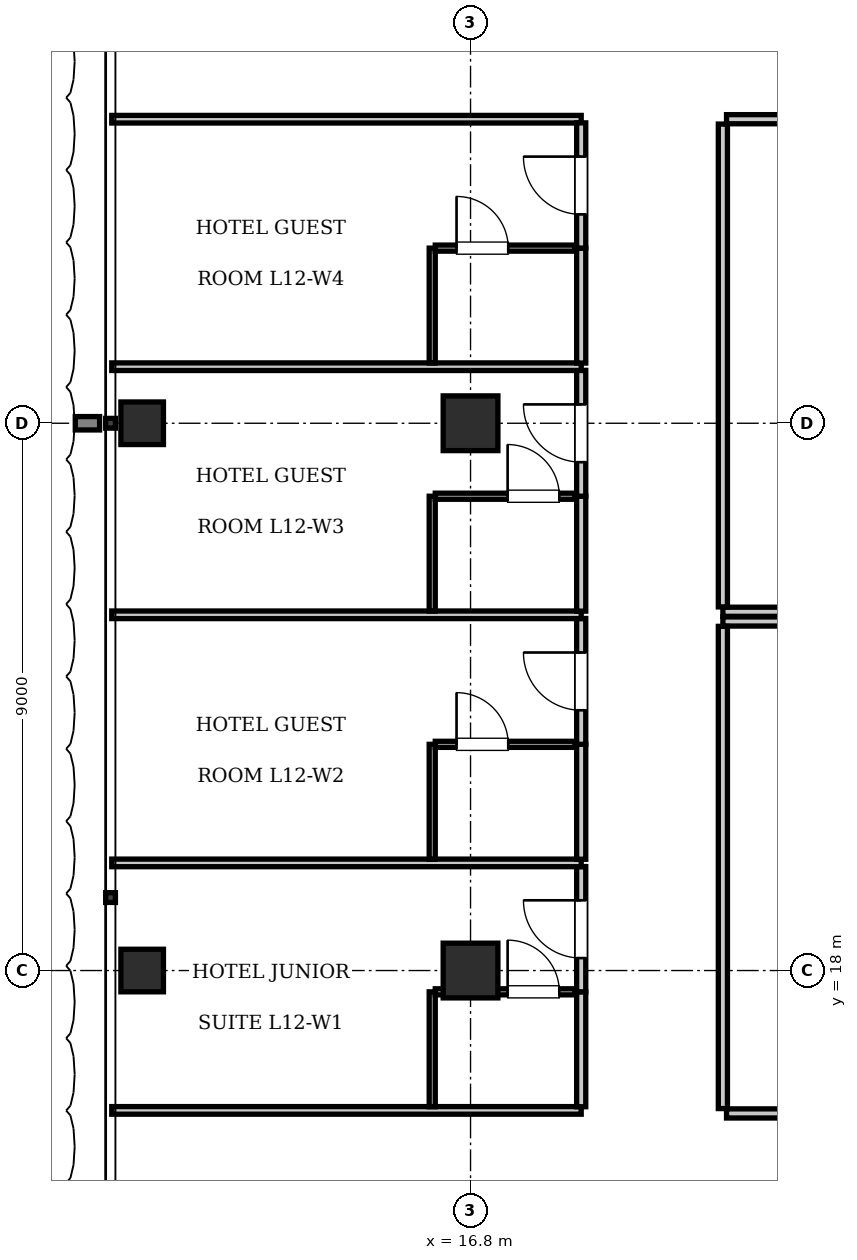
"""IFC4 building model, lengths in metres.
Left out: names, types, materials, properties, quantities, classifications, styles, units other than length and angle.
Written with IfcOpenShell. Run it as: python <this file> out.ifc"""

import sys

from ifc_helpers import new_model, si_unit, direction, frame, frame_2d, origin, origin_2d, place, context, subcontext, project, spatial, rectangle, i_section, extrude, element, fill, save


model = new_model("IFC4")
c1 = context("Model", 3, precision=1e-05, world=origin(), true_north=direction((0.0, 1.0)))
c2 = subcontext(c1, "Body", "Model", "MODEL_VIEW")
j1 = project(units=[si_unit("LENGTHUNIT", "METRE"), si_unit("PLANEANGLEUNIT", "RADIAN")], contexts=[c1])
p1 = place(None, origin())
s1 = spatial("IfcSite", under=j1, at=p1, CompositionType="ELEMENT")
p2 = place(p1, origin())
s2 = spatial("IfcBuilding", under=s1, at=p2, CompositionType="ELEMENT")
p3 = place(p2, frame((0.0, 0.0, 53.9)))
s3 = spatial("IfcBuildingStorey", under=s2, at=p3, CompositionType="ELEMENT", Elevation=53.9)
for number, where, z_axis, x_axis in (
    (1, (16.8, 18.0, 0.0), (0.0, 0.0, 1.0), (1.0, 0.0, 0.0)),
    (2, (16.8, 27.0, 0.0), (0.0, 0.0, 1.0), (1.0, 0.0, 0.0)),
):
    element("IfcColumn", number, at=place(p3, frame(where, z_axis=z_axis, x_axis=x_axis)), inside=s3, PredefinedType="COLUMN", context=c2, shape_type="SweptSolid", body=[
        extrude(rectangle(XDim=0.9, YDim=0.9, at=origin_2d()), origin(), (0.0, 0.0, 1.0), 3.85),
    ])
for number, where, z_axis, x_axis in (
    (3, (11.4, 18.0, 0.0), (0.0, 0.0, 1.0), (1.0, 0.0, 0.0)),
    (4, (11.4, 27.0, 0.0), (0.0, 0.0, 1.0), (1.0, 0.0, 0.0)),
):
    element("IfcColumn", number, at=place(p3, frame(where, z_axis=z_axis, x_axis=x_axis)), inside=s3, PredefinedType="COLUMN", context=c2, shape_type="SweptSolid", body=[
        extrude(i_section(OverallWidth=0.7, OverallDepth=0.7, WebThickness=0.028, FlangeThickness=0.044, at=origin_2d()), origin(), (0.0, 0.0, 1.0), 3.85),
    ])
p4 = place(p3, frame((20.95, 23.9, 0.0), z_axis=(0.0, 0.0, 1.0), x_axis=(1.0, 0.0, 0.0)))
e5 = element("IfcWall", 5, at=p4, inside=s3, PredefinedType="PARTITIONING", context=c2, shape_type="SweptSolid", body=[
    extrude(rectangle(XDim=33.7, YDim=0.15, at=frame_2d((16.85, 0.0))), origin(), (0.0, 0.0, 1.0), 3.61),
])
p5 = place(p3, frame((20.95, 23.98, 0.0), z_axis=(0.0, 0.0, 1.0), x_axis=(0.0, 1.0, 0.0)))
e6 = element("IfcWall", 6, at=p5, inside=s3, PredefinedType="PARTITIONING", context=c2, shape_type="SweptSolid", body=[
    extrude(rectangle(XDim=7.94, YDim=0.15, at=frame_2d((3.97, 0.0))), origin(), (0.0, 0.0, 1.0), 3.207),
])
p6 = place(p3, frame((21.01, 32.0, 0.0), z_axis=(0.0, 0.0, 1.0), x_axis=(1.0, 0.0, 0.0)))
e7 = element("IfcWall", 7, at=p6, inside=s3, PredefinedType="PARTITIONING", context=c2, shape_type="SweptSolid", body=[
    extrude(rectangle(XDim=5.302, YDim=0.15, at=frame_2d((2.651, 0.0))), origin(), (0.0, 0.0, 1.0), 3.61),
])
p7 = place(p6, frame((2.201, 0.0, 0.0)))
e8 = element("IfcOpeningElement", 8, at=p7, cuts=e7, PredefinedType="OPENING", context=c2, shape_type="SweptSolid", body=[
    extrude(rectangle(XDim=0.9, YDim=2.1, at=frame_2d((0.45, 1.05))), frame((0.0, 0.085, 0.0), z_axis=(0.0, -1.0, 0.0), x_axis=(1.0, 0.0, 0.0)), (0.0, 0.0, 1.0), 0.17),
])
p8 = place(p3, frame((20.95, 23.74, 0.0), z_axis=(0.0, 0.0, 1.0), x_axis=(1.0, 0.0, 0.0)))
e9 = element("IfcWall", 9, at=p8, inside=s3, PredefinedType="PARTITIONING", context=c2, shape_type="SweptSolid", body=[
    extrude(rectangle(XDim=33.7, YDim=0.15, at=frame_2d((16.85, 0.0))), origin(), (0.0, 0.0, 1.0), 3.61),
])
p9 = place(p3, frame((20.95, 15.73, 0.0), z_axis=(0.0, 0.0, 1.0), x_axis=(0.0, 1.0, 0.0)))
e10 = element("IfcWall", 10, at=p9, inside=s3, PredefinedType="PARTITIONING", context=c2, shape_type="SweptSolid", body=[
    extrude(rectangle(XDim=7.93, YDim=0.15, at=frame_2d((3.965, 0.0))), origin(), (0.0, 0.0, 1.0), 3.207),
])
p10 = place(p3, frame((21.01, 15.65, 0.0), z_axis=(0.0, 0.0, 1.0), x_axis=(1.0, 0.0, 0.0)))
e11 = element("IfcWall", 11, at=p10, inside=s3, PredefinedType="PARTITIONING", context=c2, shape_type="SweptSolid", body=[
    extrude(rectangle(XDim=7.661, YDim=0.15, at=frame_2d((3.831, 0.0))), origin(), (0.0, 0.0, 1.0), 3.61),
])
p11 = place(p10, frame((3.381, 0.0, 0.0)))
e12 = element("IfcOpeningElement", 12, at=p11, cuts=e11, PredefinedType="OPENING", context=c2, shape_type="SweptSolid", body=[
    extrude(rectangle(XDim=0.9, YDim=2.1, at=frame_2d((0.45, 1.05))), frame((0.0, 0.085, 0.0), z_axis=(0.0, -1.0, 0.0), x_axis=(1.0, 0.0, 0.0)), (0.0, 0.0, 1.0), 0.17),
])
for number, where, z_axis, x_axis in (
    (13, (10.9, 15.7, 0.0), (0.0, 0.0, 1.0), (1.0, 0.0, 0.0)),
    (14, (10.9, 32.0, 0.0), (0.0, 0.0, 1.0), (1.0, 0.0, 0.0)),
):
    element("IfcWall", number, at=place(p3, frame(where, z_axis=z_axis, x_axis=x_axis)), inside=s3, PredefinedType="PARTITIONING", context=c2, shape_type="SweptSolid", body=[
        extrude(rectangle(XDim=7.72, YDim=0.125, at=frame_2d((3.86, 0.0))), origin(), (0.0, 0.0, 1.0), 3.61),
    ])
p12 = place(p3, frame((18.62, 15.76, 0.0), z_axis=(0.0, 0.0, 1.0), x_axis=(0.0, 1.0, 0.0)))
e15 = element("IfcWall", 15, at=p12, inside=s3, PredefinedType="PARTITIONING", context=c2, shape_type="SweptSolid", body=[
    extrude(rectangle(XDim=1.89, YDim=0.15, at=frame_2d((0.945, 0.0))), origin(), (0.0, 0.0, 1.0), 3.61),
])
p13 = place(p3, frame((18.62, 17.65, 0.0), z_axis=(0.0, 0.0, 1.0), x_axis=(0.0, 1.0, 0.0)))
e16 = element("IfcWall", 16, at=p13, inside=s3, PredefinedType="PARTITIONING", context=c2, shape_type="SweptSolid", body=[
    extrude(rectangle(XDim=2.06, YDim=0.15, at=frame_2d((1.03, 0.0))), origin(), (0.0, 0.0, 1.0), 3.61),
])
p14 = place(p13, frame((0.555, 0.0, 0.0)))
e17 = element("IfcOpeningElement", 17, at=p14, cuts=e16, PredefinedType="OPENING", context=c2, shape_type="SweptSolid", body=[
    extrude(rectangle(XDim=0.95, YDim=2.15, at=frame_2d((0.475, 1.075))), frame((0.0, 0.085, 0.0), z_axis=(0.0, -1.0, 0.0), x_axis=(1.0, 0.0, 0.0)), (0.0, 0.0, 1.0), 0.17),
])
p15 = place(p3, frame((16.17, 15.76, 0.0), z_axis=(0.0, 0.0, 1.0), x_axis=(0.0, 1.0, 0.0)))
e18 = element("IfcWall", 18, at=p15, inside=s3, PredefinedType="PARTITIONING", context=c2, shape_type="SweptSolid", body=[
    extrude(rectangle(XDim=1.89, YDim=0.1, at=frame_2d((0.945, 0.0))), origin(), (0.0, 0.0, 1.0), 3.61),
])
p16 = place(p3, frame((16.22, 17.65, 0.0), z_axis=(0.0, 0.0, 1.0), x_axis=(1.0, 0.0, 0.0)))
e19 = element("IfcWall", 19, at=p16, inside=s3, PredefinedType="PARTITIONING", context=c2, shape_type="SweptSolid", body=[
    extrude(rectangle(XDim=2.3, YDim=0.1, at=frame_2d((1.15, 0.0))), origin(), (0.0, 0.0, 1.0), 3.61),
])
p17 = place(p16, frame((1.19, 0.0, 0.0)))
e20 = element("IfcOpeningElement", 20, at=p17, cuts=e19, PredefinedType="OPENING", context=c2, shape_type="SweptSolid", body=[
    extrude(rectangle(XDim=0.85, YDim=2.1, at=frame_2d((0.425, 1.05))), frame((0.0, 0.06, 0.0), z_axis=(0.0, -1.0, 0.0), x_axis=(1.0, 0.0, 0.0)), (0.0, 0.0, 1.0), 0.12),
])
p18 = place(p3, frame((10.9, 19.77, 0.0), z_axis=(0.0, 0.0, 1.0), x_axis=(1.0, 0.0, 0.0)))
e21 = element("IfcWall", 21, at=p18, inside=s3, PredefinedType="PARTITIONING", context=c2, shape_type="SweptSolid", body=[
    extrude(rectangle(XDim=7.72, YDim=0.125, at=frame_2d((3.86, 0.0))), origin(), (0.0, 0.0, 1.0), 3.61),
])
p19 = place(p3, frame((18.62, 19.83, 0.0), z_axis=(0.0, 0.0, 1.0), x_axis=(0.0, 1.0, 0.0)))
e22 = element("IfcWall", 22, at=p19, inside=s3, PredefinedType="PARTITIONING", context=c2, shape_type="SweptSolid", body=[
    extrude(rectangle(XDim=1.89, YDim=0.15, at=frame_2d((0.945, 0.0))), origin(), (0.0, 0.0, 1.0), 3.61),
])
p20 = place(p3, frame((18.62, 21.72, 0.0), z_axis=(0.0, 0.0, 1.0), x_axis=(0.0, 1.0, 0.0)))
e23 = element("IfcWall", 23, at=p20, inside=s3, PredefinedType="PARTITIONING", context=c2, shape_type="SweptSolid", body=[
    extrude(rectangle(XDim=2.07, YDim=0.15, at=frame_2d((1.035, 0.0))), origin(), (0.0, 0.0, 1.0), 3.61),
])
p21 = place(p20, frame((0.56, 0.0, 0.0)))
e24 = element("IfcOpeningElement", 24, at=p21, cuts=e23, PredefinedType="OPENING", context=c2, shape_type="SweptSolid", body=[
    extrude(rectangle(XDim=0.95, YDim=2.15, at=frame_2d((0.475, 1.075))), frame((0.0, 0.085, 0.0), z_axis=(0.0, -1.0, 0.0), x_axis=(1.0, 0.0, 0.0)), (0.0, 0.0, 1.0), 0.17),
])
p22 = place(p3, frame((16.17, 19.83, 0.0), z_axis=(0.0, 0.0, 1.0), x_axis=(0.0, 1.0, 0.0)))
e25 = element("IfcWall", 25, at=p22, inside=s3, PredefinedType="PARTITIONING", context=c2, shape_type="SweptSolid", body=[
    extrude(rectangle(XDim=1.89, YDim=0.1, at=frame_2d((0.945, 0.0))), origin(), (0.0, 0.0, 1.0), 3.61),
])
p23 = place(p3, frame((16.22, 21.72, 0.0), z_axis=(0.0, 0.0, 1.0), x_axis=(1.0, 0.0, 0.0)))
e26 = element("IfcWall", 26, at=p23, inside=s3, PredefinedType="PARTITIONING", context=c2, shape_type="SweptSolid", body=[
    extrude(rectangle(XDim=2.3, YDim=0.1, at=frame_2d((1.15, 0.0))), origin(), (0.0, 0.0, 1.0), 3.61),
])
p24 = place(p23, frame((0.35, 0.0, 0.0)))
e27 = element("IfcOpeningElement", 27, at=p24, cuts=e26, PredefinedType="OPENING", context=c2, shape_type="SweptSolid", body=[
    extrude(rectangle(XDim=0.85, YDim=2.1, at=frame_2d((0.425, 1.05))), frame((0.0, 0.06, 0.0), z_axis=(0.0, -1.0, 0.0), x_axis=(1.0, 0.0, 0.0)), (0.0, 0.0, 1.0), 0.12),
])
p25 = place(p3, frame((10.9, 23.85, 0.0), z_axis=(0.0, 0.0, 1.0), x_axis=(1.0, 0.0, 0.0)))
e28 = element("IfcWall", 28, at=p25, inside=s3, PredefinedType="PARTITIONING", context=c2, shape_type="SweptSolid", body=[
    extrude(rectangle(XDim=7.72, YDim=0.125, at=frame_2d((3.86, 0.0))), origin(), (0.0, 0.0, 1.0), 3.61),
])
p26 = place(p3, frame((18.62, 23.91, 0.0), z_axis=(0.0, 0.0, 1.0), x_axis=(0.0, 1.0, 0.0)))
e29 = element("IfcWall", 29, at=p26, inside=s3, PredefinedType="PARTITIONING", context=c2, shape_type="SweptSolid", body=[
    extrude(rectangle(XDim=1.89, YDim=0.15, at=frame_2d((0.945, 0.0))), origin(), (0.0, 0.0, 1.0), 3.61),
])
p27 = place(p3, frame((18.62, 25.8, 0.0), z_axis=(0.0, 0.0, 1.0), x_axis=(0.0, 1.0, 0.0)))
e30 = element("IfcWall", 30, at=p27, inside=s3, PredefinedType="PARTITIONING", context=c2, shape_type="SweptSolid", body=[
    extrude(rectangle(XDim=2.07, YDim=0.15, at=frame_2d((1.035, 0.0))), origin(), (0.0, 0.0, 1.0), 3.61),
])
p28 = place(p27, frame((0.56, 0.0, 0.0)))
e31 = element("IfcOpeningElement", 31, at=p28, cuts=e30, PredefinedType="OPENING", context=c2, shape_type="SweptSolid", body=[
    extrude(rectangle(XDim=0.95, YDim=2.15, at=frame_2d((0.475, 1.075))), frame((0.0, 0.085, 0.0), z_axis=(0.0, -1.0, 0.0), x_axis=(1.0, 0.0, 0.0)), (0.0, 0.0, 1.0), 0.17),
])
p29 = place(p3, frame((16.17, 23.91, 0.0), z_axis=(0.0, 0.0, 1.0), x_axis=(0.0, 1.0, 0.0)))
e32 = element("IfcWall", 32, at=p29, inside=s3, PredefinedType="PARTITIONING", context=c2, shape_type="SweptSolid", body=[
    extrude(rectangle(XDim=1.89, YDim=0.1, at=frame_2d((0.945, 0.0))), origin(), (0.0, 0.0, 1.0), 3.61),
])
p30 = place(p3, frame((16.22, 25.8, 0.0), z_axis=(0.0, 0.0, 1.0), x_axis=(1.0, 0.0, 0.0)))
e33 = element("IfcWall", 33, at=p30, inside=s3, PredefinedType="PARTITIONING", context=c2, shape_type="SweptSolid", body=[
    extrude(rectangle(XDim=2.3, YDim=0.1, at=frame_2d((1.15, 0.0))), origin(), (0.0, 0.0, 1.0), 3.61),
])
p31 = place(p30, frame((1.19, 0.0, 0.0)))
e34 = element("IfcOpeningElement", 34, at=p31, cuts=e33, PredefinedType="OPENING", context=c2, shape_type="SweptSolid", body=[
    extrude(rectangle(XDim=0.85, YDim=2.1, at=frame_2d((0.425, 1.05))), frame((0.0, 0.06, 0.0), z_axis=(0.0, -1.0, 0.0), x_axis=(1.0, 0.0, 0.0)), (0.0, 0.0, 1.0), 0.12),
])
p32 = place(p3, frame((10.9, 27.93, 0.0), z_axis=(0.0, 0.0, 1.0), x_axis=(1.0, 0.0, 0.0)))
e35 = element("IfcWall", 35, at=p32, inside=s3, PredefinedType="PARTITIONING", context=c2, shape_type="SweptSolid", body=[
    extrude(rectangle(XDim=7.72, YDim=0.125, at=frame_2d((3.86, 0.0))), origin(), (0.0, 0.0, 1.0), 3.61),
])
p33 = place(p3, frame((18.62, 27.99, 0.0), z_axis=(0.0, 0.0, 1.0), x_axis=(0.0, 1.0, 0.0)))
e36 = element("IfcWall", 36, at=p33, inside=s3, PredefinedType="PARTITIONING", context=c2, shape_type="SweptSolid", body=[
    extrude(rectangle(XDim=1.89, YDim=0.15, at=frame_2d((0.945, 0.0))), origin(), (0.0, 0.0, 1.0), 3.61),
])
p34 = place(p3, frame((18.62, 29.88, 0.0), z_axis=(0.0, 0.0, 1.0), x_axis=(0.0, 1.0, 0.0)))
e37 = element("IfcWall", 37, at=p34, inside=s3, PredefinedType="PARTITIONING", context=c2, shape_type="SweptSolid", body=[
    extrude(rectangle(XDim=2.06, YDim=0.15, at=frame_2d((1.03, 0.0))), origin(), (0.0, 0.0, 1.0), 3.61),
])
p35 = place(p34, frame((0.555, 0.0, 0.0)))
e38 = element("IfcOpeningElement", 38, at=p35, cuts=e37, PredefinedType="OPENING", context=c2, shape_type="SweptSolid", body=[
    extrude(rectangle(XDim=0.95, YDim=2.15, at=frame_2d((0.475, 1.075))), frame((0.0, 0.085, 0.0), z_axis=(0.0, -1.0, 0.0), x_axis=(1.0, 0.0, 0.0)), (0.0, 0.0, 1.0), 0.17),
])
p36 = place(p3, frame((16.17, 27.99, 0.0), z_axis=(0.0, 0.0, 1.0), x_axis=(0.0, 1.0, 0.0)))
e39 = element("IfcWall", 39, at=p36, inside=s3, PredefinedType="PARTITIONING", context=c2, shape_type="SweptSolid", body=[
    extrude(rectangle(XDim=1.89, YDim=0.1, at=frame_2d((0.945, 0.0))), origin(), (0.0, 0.0, 1.0), 3.61),
])
p37 = place(p3, frame((16.22, 29.88, 0.0), z_axis=(0.0, 0.0, 1.0), x_axis=(1.0, 0.0, 0.0)))
e40 = element("IfcWall", 40, at=p37, inside=s3, PredefinedType="PARTITIONING", context=c2, shape_type="SweptSolid", body=[
    extrude(rectangle(XDim=2.3, YDim=0.1, at=frame_2d((1.15, 0.0))), origin(), (0.0, 0.0, 1.0), 3.61),
])
p38 = place(p37, frame((0.35, 0.0, 0.0)))
e41 = element("IfcOpeningElement", 41, at=p38, cuts=e40, PredefinedType="OPENING", context=c2, shape_type="SweptSolid", body=[
    extrude(rectangle(XDim=0.85, YDim=2.1, at=frame_2d((0.425, 1.05))), frame((0.0, 0.06, 0.0), z_axis=(0.0, -1.0, 0.0), x_axis=(1.0, 0.0, 0.0)), (0.0, 0.0, 1.0), 0.12),
])
p39 = place(p17, origin())
e42 = element("IfcDoor", 42, at=p39, inside=s3, OperationType="SINGLE_SWING_LEFT", PredefinedType="DOOR", context=c2, shape_type="SweptSolid", body=[
    extrude(rectangle(XDim=0.85, YDim=2.1, at=frame_2d((0.425, 1.05))), frame((0.0, 0.025, 0.0), z_axis=(0.0, -1.0, 0.0), x_axis=(1.0, 0.0, 0.0)), (0.0, 0.0, 1.0), 0.05),
])
fill(e20, e42)
p40 = place(p14, origin())
e43 = element("IfcDoor", 43, at=p40, inside=s3, OperationType="SINGLE_SWING_RIGHT", PredefinedType="DOOR", context=c2, shape_type="SweptSolid", body=[
    extrude(rectangle(XDim=0.95, YDim=2.15, at=frame_2d((0.475, 1.075))), frame((0.0, 0.025, 0.0), z_axis=(0.0, -1.0, 0.0), x_axis=(1.0, 0.0, 0.0)), (0.0, 0.0, 1.0), 0.05),
])
fill(e17, e43)
p41 = place(p24, origin())
e44 = element("IfcDoor", 44, at=p41, inside=s3, OperationType="SINGLE_SWING_LEFT", PredefinedType="DOOR", context=c2, shape_type="SweptSolid", body=[
    extrude(rectangle(XDim=0.85, YDim=2.1, at=frame_2d((0.425, 1.05))), frame((0.0, 0.025, 0.0), z_axis=(0.0, -1.0, 0.0), x_axis=(1.0, 0.0, 0.0)), (0.0, 0.0, 1.0), 0.05),
])
fill(e27, e44)
p42 = place(p21, origin())
e45 = element("IfcDoor", 45, at=p42, inside=s3, OperationType="SINGLE_SWING_RIGHT", PredefinedType="DOOR", context=c2, shape_type="SweptSolid", body=[
    extrude(rectangle(XDim=0.95, YDim=2.15, at=frame_2d((0.475, 1.075))), frame((0.0, 0.025, 0.0), z_axis=(0.0, -1.0, 0.0), x_axis=(1.0, 0.0, 0.0)), (0.0, 0.0, 1.0), 0.05),
])
fill(e24, e45)
p43 = place(p31, origin())
e46 = element("IfcDoor", 46, at=p43, inside=s3, OperationType="SINGLE_SWING_LEFT", PredefinedType="DOOR", context=c2, shape_type="SweptSolid", body=[
    extrude(rectangle(XDim=0.85, YDim=2.1, at=frame_2d((0.425, 1.05))), frame((0.0, 0.025, 0.0), z_axis=(0.0, -1.0, 0.0), x_axis=(1.0, 0.0, 0.0)), (0.0, 0.0, 1.0), 0.05),
])
fill(e34, e46)
p44 = place(p28, origin())
e47 = element("IfcDoor", 47, at=p44, inside=s3, OperationType="SINGLE_SWING_RIGHT", PredefinedType="DOOR", context=c2, shape_type="SweptSolid", body=[
    extrude(rectangle(XDim=0.95, YDim=2.15, at=frame_2d((0.475, 1.075))), frame((0.0, 0.025, 0.0), z_axis=(0.0, -1.0, 0.0), x_axis=(1.0, 0.0, 0.0)), (0.0, 0.0, 1.0), 0.05),
])
fill(e31, e47)
p45 = place(p38, origin())
e48 = element("IfcDoor", 48, at=p45, inside=s3, OperationType="SINGLE_SWING_LEFT", PredefinedType="DOOR", context=c2, shape_type="SweptSolid", body=[
    extrude(rectangle(XDim=0.85, YDim=2.1, at=frame_2d((0.425, 1.05))), frame((0.0, 0.025, 0.0), z_axis=(0.0, -1.0, 0.0), x_axis=(1.0, 0.0, 0.0)), (0.0, 0.0, 1.0), 0.05),
])
fill(e41, e48)
p46 = place(p35, origin())
e49 = element("IfcDoor", 49, at=p46, inside=s3, OperationType="SINGLE_SWING_RIGHT", PredefinedType="DOOR", context=c2, shape_type="SweptSolid", body=[
    extrude(rectangle(XDim=0.95, YDim=2.15, at=frame_2d((0.475, 1.075))), frame((0.0, 0.025, 0.0), z_axis=(0.0, -1.0, 0.0), x_axis=(1.0, 0.0, 0.0)), (0.0, 0.0, 1.0), 0.05),
])
fill(e38, e49)
save(model, sys.argv[1])
